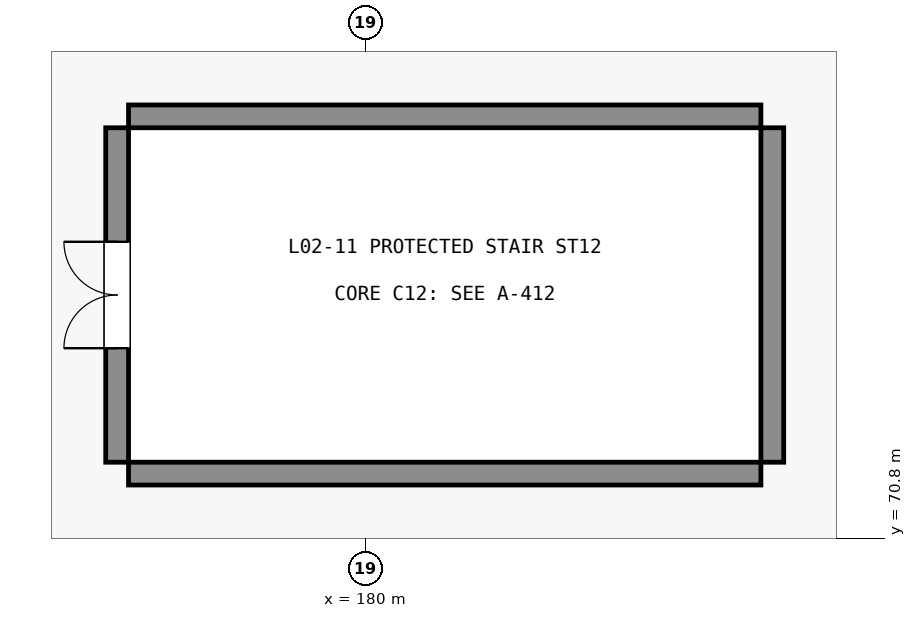
"""IFC4 building model, lengths in metres.
Left out: names, types, materials, properties, quantities, classifications, styles, units other than length and angle.
Written with IfcOpenShell. Run it as: python <this file> out.ifc"""

import sys

from ifc_helpers import new_model, si_unit, direction, frame, frame_2d, origin, place, context, subcontext, project, spatial, rectangle, extrude, element, fill, save


model = new_model("IFC4")
c1 = context("Model", 3, precision=1e-05, world=origin(), true_north=direction((0.0, 1.0)))
c2 = subcontext(c1, "Body", "Model", "MODEL_VIEW")
j1 = project(units=[si_unit("LENGTHUNIT", "METRE"), si_unit("PLANEANGLEUNIT", "RADIAN")], contexts=[c1])
p1 = place(None, origin())
s1 = spatial("IfcSite", under=j1, at=p1, CompositionType="ELEMENT")
p2 = place(p1, origin())
s2 = spatial("IfcBuilding", under=s1, at=p2, CompositionType="ELEMENT")
p3 = place(p2, frame((0.0, 0.0, 11.4)))
s3 = spatial("IfcBuildingStorey", under=s2, at=p3, CompositionType="ELEMENT", Elevation=11.4)
for number, where, z_axis, x_axis in (
    (1, (176.88, 71.65, 0.0), (0.0, 0.0, 1.0), (1.0, 0.0, 0.0)),
    (2, (176.88, 76.35, 0.0), (0.0, 0.0, 1.0), (1.0, 0.0, 0.0)),
):
    element("IfcWall", number, at=place(p3, frame(where, z_axis=z_axis, x_axis=x_axis)), inside=s3, PredefinedType="SHEAR", context=c2, shape_type="SweptSolid", body=[
        extrude(rectangle(XDim=8.32, YDim=0.3, at=frame_2d((4.16, 0.0))), origin(), (0.0, 0.0, 1.0), 4.48),
    ])
p4 = place(p3, frame((176.73, 71.8, 0.0), z_axis=(0.0, 0.0, 1.0), x_axis=(0.0, 1.0, 0.0)))
e3 = element("IfcWall", 3, at=p4, inside=s3, PredefinedType="SHEAR", context=c2, shape_type="SweptSolid", body=[
    extrude(rectangle(XDim=4.4, YDim=0.3, at=frame_2d((2.2, 0.0))), origin(), (0.0, 0.0, 1.0), 4.48),
])
p5 = place(p4, frame((1.5, 0.0, 0.0)))
e4 = element("IfcOpeningElement", 4, at=p5, cuts=e3, PredefinedType="OPENING", context=c2, shape_type="SweptSolid", body=[
    extrude(rectangle(XDim=1.4, YDim=2.2, at=frame_2d((0.7, 1.1))), frame((0.0, 0.16, 0.0), z_axis=(0.0, -1.0, 0.0), x_axis=(1.0, 0.0, 0.0)), (0.0, 0.0, 1.0), 0.32),
])
p6 = place(p3, frame((185.35, 71.8, 0.0), z_axis=(0.0, 0.0, 1.0), x_axis=(0.0, 1.0, 0.0)))
e5 = element("IfcWall", 5, at=p6, inside=s3, PredefinedType="SHEAR", context=c2, shape_type="SweptSolid", body=[
    extrude(rectangle(XDim=4.4, YDim=0.3, at=frame_2d((2.2, 0.0))), origin(), (0.0, 0.0, 1.0), 4.48),
])
p7 = place(p5, origin())
e6 = element("IfcDoor", 6, at=p7, inside=s3, OperationType="DOUBLE_DOOR_SINGLE_SWING", PredefinedType="DOOR", context=c2, shape_type="SweptSolid", body=[
    extrude(rectangle(XDim=1.4, YDim=2.2, at=frame_2d((0.7, 1.1))), frame((0.0, 0.025, 0.0), z_axis=(0.0, -1.0, 0.0), x_axis=(1.0, 0.0, 0.0)), (0.0, 0.0, 1.0), 0.05),
])
fill(e4, e6)
save(model, sys.argv[1])
